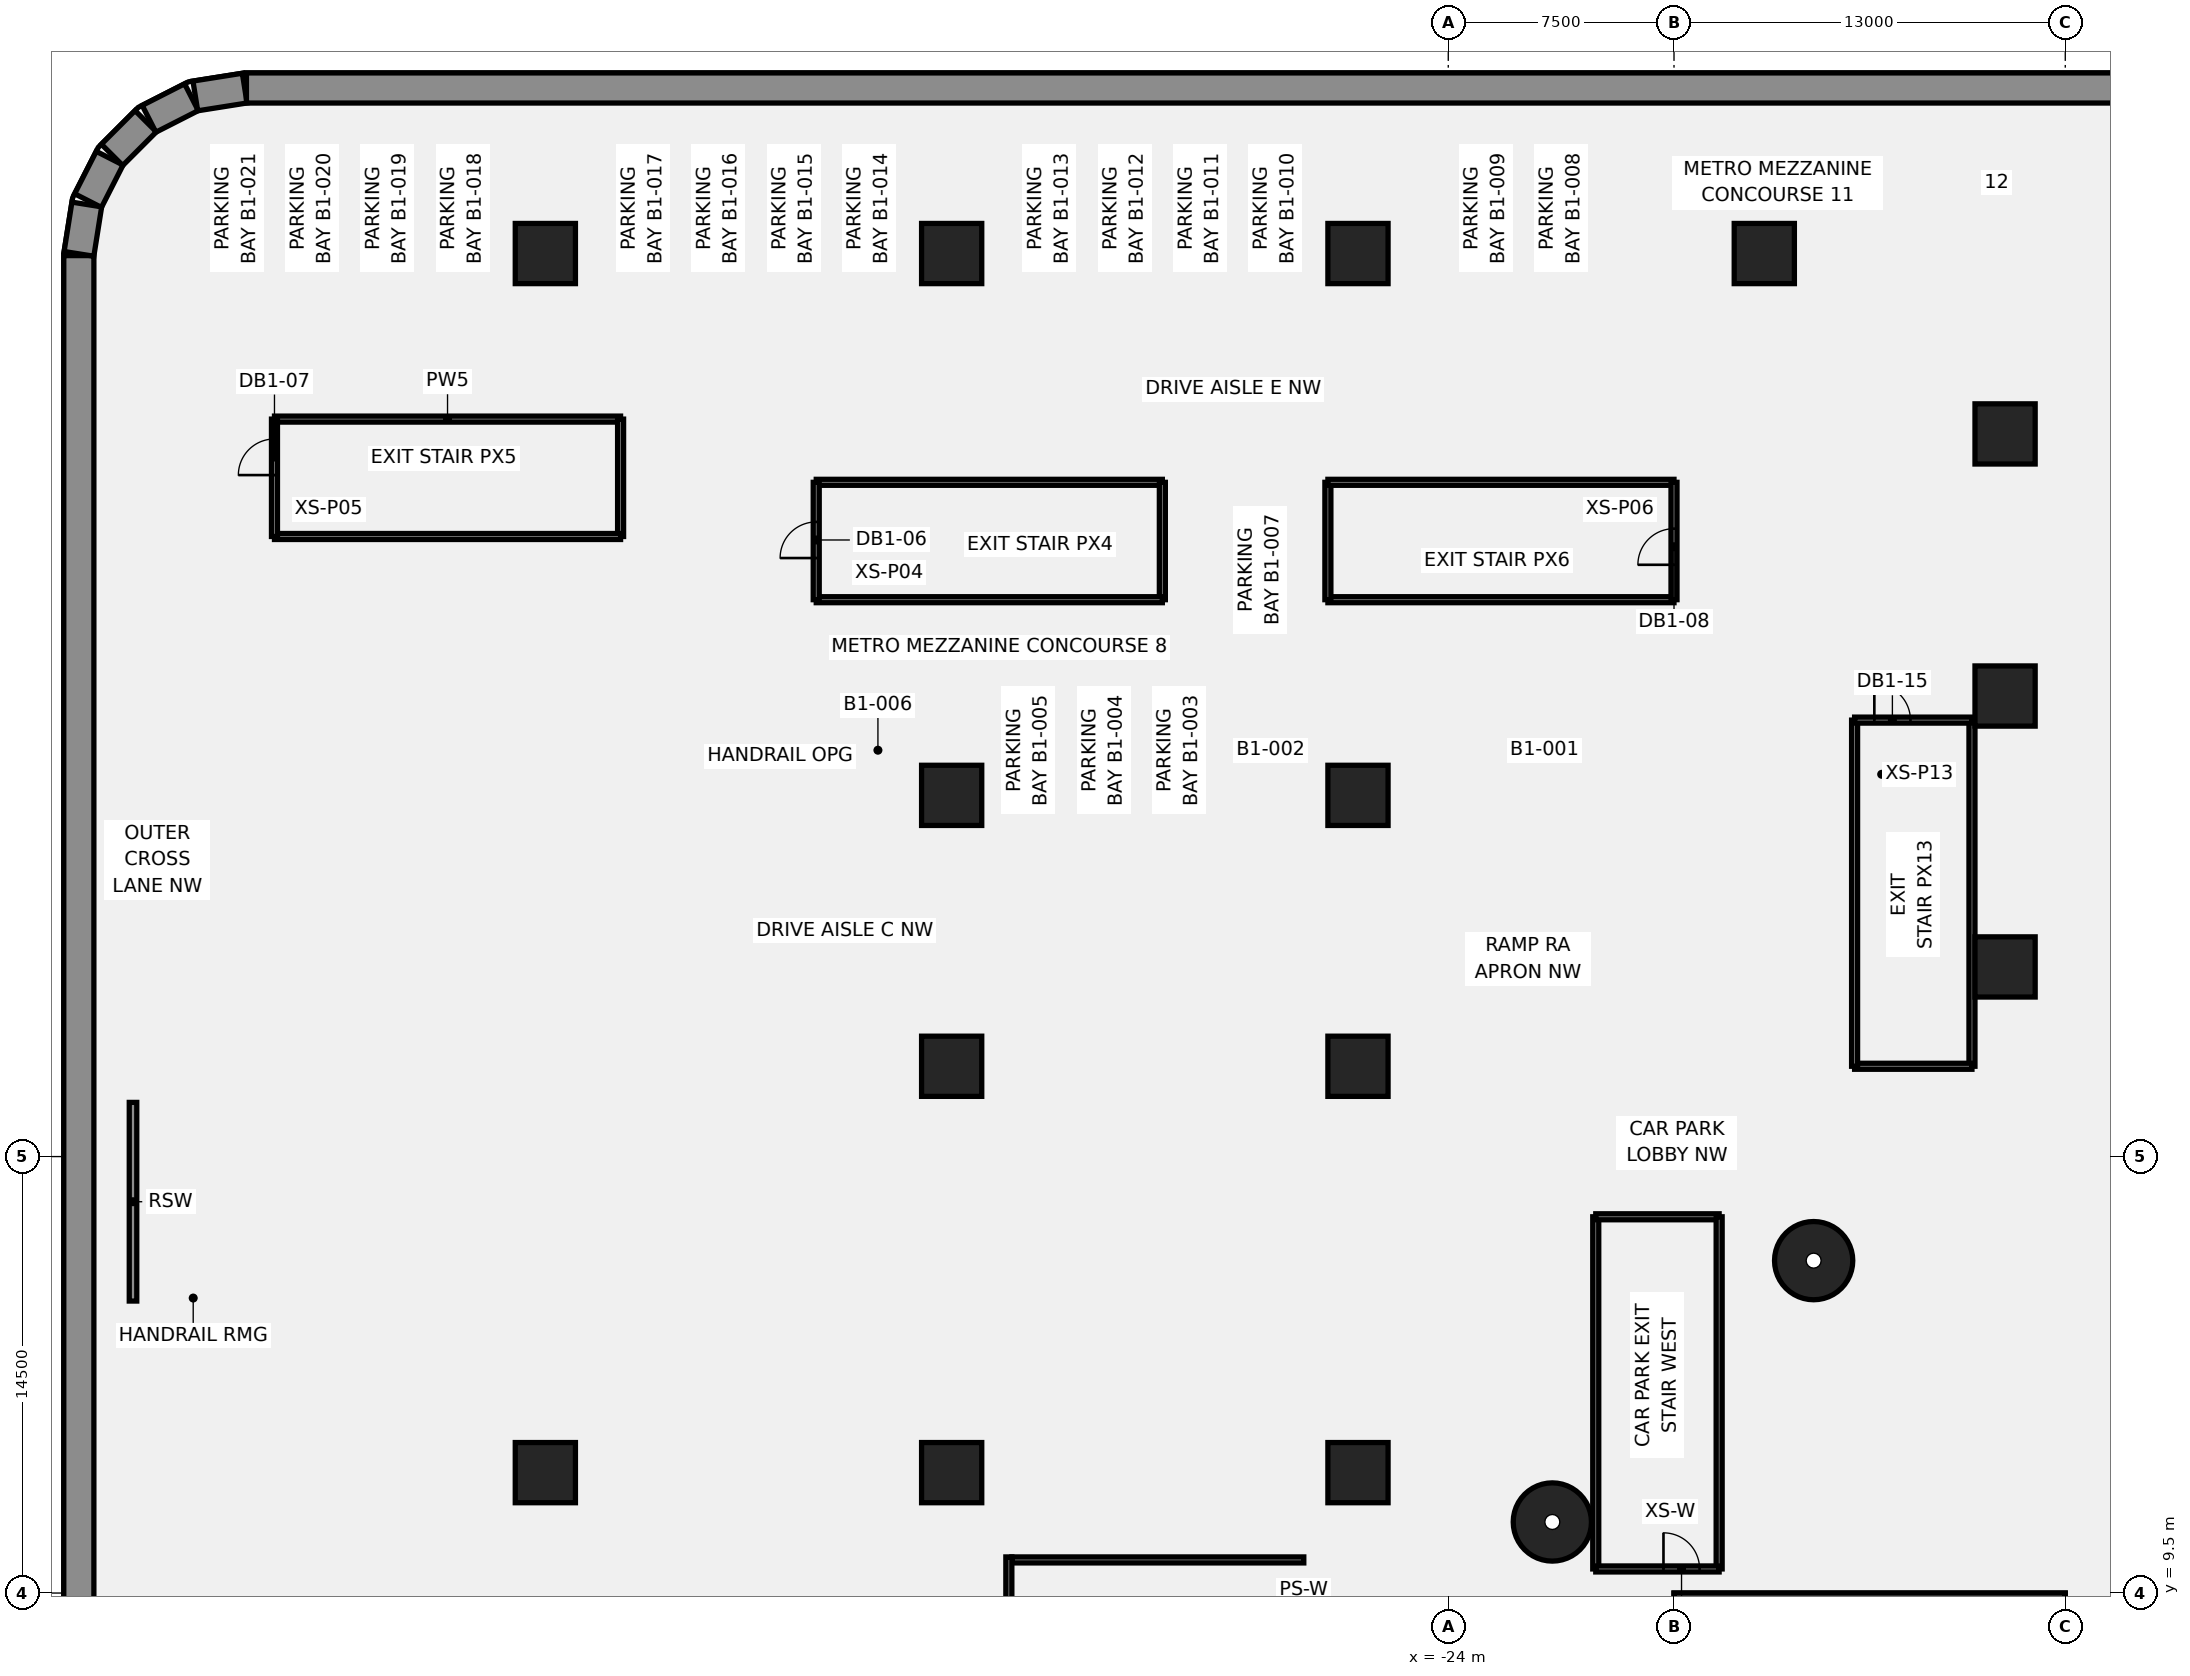
"""IFC4 building model, lengths in metres.
Left out: names, types, materials, properties, quantities, classifications, styles, units other than length and angle.
Written with IfcOpenShell. Run it as: python <this file> out.ifc"""

import sys

from ifc_helpers import new_model, si_unit, direction, frame, frame_2d, origin, origin_2d, place, context, subcontext, project, spatial, rectangle, circle, extrude, element, fill, save


model = new_model("IFC4")
c1 = context("Model", 3, precision=1e-05, world=origin(), true_north=direction((0.0, 1.0)))
c2 = subcontext(c1, "Body", "Model", "MODEL_VIEW")
j1 = project(units=[si_unit("LENGTHUNIT", "METRE"), si_unit("PLANEANGLEUNIT", "RADIAN")], contexts=[c1])
p1 = place(None, origin())
s1 = spatial("IfcSite", under=j1, at=p1, CompositionType="ELEMENT")
p2 = place(p1, origin())
s2 = spatial("IfcBuilding", under=s1, at=p2, CompositionType="ELEMENT")
p3 = place(p2, frame((0.0, 0.0, -7.0)))
s3 = spatial("IfcBuildingStorey", under=s2, at=p3, CompositionType="ELEMENT", Elevation=-7.0)
p4 = place(p3, frame((-69.5, -53.931, -0.45), z_axis=(0.0, 0.0, 1.0), x_axis=(0.0, 1.0, 0.0)))
e1 = element("IfcWall", 1, at=p4, inside=s3, PredefinedType="SOLIDWALL", context=c2, shape_type="SweptSolid", body=[
    extrude(rectangle(XDim=107.863, YDim=1.0, at=frame_2d((53.931, 0.0))), origin(), (0.0, 0.0, 1.0), 6.9),
])
p5 = place(p3, frame((-69.495, 53.99, -0.45), z_axis=(0.0, 0.0, 1.0), x_axis=(0.156430639922, 0.987688946427, 0.0)))
e2 = element("IfcWall", 2, at=p5, inside=s3, PredefinedType="SOLIDWALL", context=c2, shape_type="SweptSolid", body=[
    extrude(rectangle(XDim=1.661, YDim=1.0, at=frame_2d((0.83, 0.0))), origin(), (0.0, 0.0, 1.0), 6.9),
])
for number, where, z_axis, x_axis in (
    (3, (-69.194, 55.759, -0.45), (0.0, 0.0, 1.0), (0.454, 0.891, 0.0)),
    (4, (-68.396, 57.278, -0.45), (0.0, 0.0, 1.0), (0.707, 0.707, 0.0)),
    (5, (-67.168, 58.476, -0.45), (0.0, 0.0, 1.0), (0.891, 0.454, 0.0)),
):
    element("IfcWall", number, at=place(p3, frame(where, z_axis=z_axis, x_axis=x_axis)), inside=s3, PredefinedType="SOLIDWALL", context=c2, shape_type="SweptSolid", body=[
        extrude(rectangle(XDim=1.581, YDim=1.0, at=frame_2d((0.791, 0.0))), origin(), (0.0, 0.0, 1.0), 6.9),
    ])
p6 = place(p3, frame((-65.63, 59.236, -0.45), z_axis=(0.0, 0.0, 1.0), x_axis=(0.987688946427, 0.156430639922, 0.0)))
e6 = element("IfcWall", 6, at=p6, inside=s3, PredefinedType="SOLIDWALL", context=c2, shape_type="SweptSolid", body=[
    extrude(rectangle(XDim=1.661, YDim=1.0, at=frame_2d((0.83, 0.0))), origin(), (0.0, 0.0, 1.0), 6.9),
])
p7 = place(p3, frame((-63.931, 59.5, -0.45), z_axis=(0.0, 0.0, 1.0), x_axis=(1.0, 0.0, 0.0)))
e7 = element("IfcWall", 7, at=p7, inside=s3, PredefinedType="SOLIDWALL", context=c2, shape_type="SweptSolid", body=[
    extrude(rectangle(XDim=127.863, YDim=1.0, at=frame_2d((63.931, 0.0))), origin(), (0.0, 0.0, 1.0), 6.9),
])
for number, where, z_axis, x_axis in (
    (8, (-11.86, 20.543, -0.45), (0.0, 0.0, 1.0), (1.0, 0.0, 0.0)),
    (9, (-20.543, 11.86, -0.45), (0.0, 0.0, 1.0), (1.0, 0.0, 0.0)),
):
    element("IfcColumn", number, at=place(p3, frame(where, z_axis=z_axis, x_axis=x_axis)), inside=s3, PredefinedType="COLUMN", context=c2, shape_type="SweptSolid", body=[
        extrude(circle(Radius=1.3, at=origin_2d()), origin(), (0.0, 0.0, 1.0), 6.9),
    ])
for number, where, z_axis, x_axis in (
    (10, (-5.5, 39.3, -0.45), (0.0, 0.0, 1.0), (1.0, 0.0, 0.0)),
    (11, (-5.5, 30.3, -0.45), (0.0, 0.0, 1.0), (1.0, 0.0, 0.0)),
    (12, (-5.5, 48.008, -0.45), (0.0, 0.0, 1.0), (1.0, 0.0, 0.0)),
    (13, (-54.0, 13.5, -0.45), (0.0, 0.0, 1.0), (1.0, 0.0, 0.0)),
    (14, (-54.0, 54.0, -0.45), (0.0, 0.0, 1.0), (1.0, 0.0, 0.0)),
    (15, (-40.5, 13.5, -0.45), (0.0, 0.0, 1.0), (1.0, 0.0, 0.0)),
    (16, (-40.5, 27.0, -0.45), (0.0, 0.0, 1.0), (1.0, 0.0, 0.0)),
    (17, (-40.5, 36.0, -0.45), (0.0, 0.0, 1.0), (1.0, 0.0, 0.0)),
    (18, (-40.5, 54.0, -0.45), (0.0, 0.0, 1.0), (1.0, 0.0, 0.0)),
    (19, (-27.0, 13.5, -0.45), (0.0, 0.0, 1.0), (1.0, 0.0, 0.0)),
    (20, (-27.0, 27.0, -0.45), (0.0, 0.0, 1.0), (1.0, 0.0, 0.0)),
    (21, (-27.0, 36.0, -0.45), (0.0, 0.0, 1.0), (1.0, 0.0, 0.0)),
    (22, (-27.0, 54.0, -0.45), (0.0, 0.0, 1.0), (1.0, 0.0, 0.0)),
    (23, (-13.5, 54.0, -0.45), (0.0, 0.0, 1.0), (1.0, 0.0, 0.0)),
):
    element("IfcColumn", number, at=place(p3, frame(where, z_axis=z_axis, x_axis=x_axis)), inside=s3, PredefinedType="COLUMN", context=c2, shape_type="SweptSolid", body=[
        extrude(rectangle(XDim=2.0, YDim=2.0, at=origin_2d()), origin(), (0.0, 0.0, 1.0), 6.9),
    ])
p8 = place(p3, frame((-63.0, 48.5, 0.0), z_axis=(0.0, 0.0, 1.0), x_axis=(1.0, 0.0, 0.0)))
e24 = element("IfcWall", 24, at=p8, inside=s3, PredefinedType="PARTITIONING", context=c2, shape_type="SweptSolid", body=[
    extrude(rectangle(XDim=11.5, YDim=0.2, at=frame_2d((5.75, 0.0))), origin(), (0.0, 0.0, 1.0), 6.45),
])
p9 = place(p3, frame((-51.5, 44.6, 0.0), z_axis=(0.0, 0.0, 1.0), x_axis=(0.0, 1.0, 0.0)))
e25 = element("IfcWall", 25, at=p9, inside=s3, PredefinedType="PARTITIONING", context=c2, shape_type="SweptSolid", body=[
    extrude(rectangle(XDim=3.9, YDim=0.2, at=frame_2d((1.95, 0.0))), origin(), (0.0, 0.0, 1.0), 6.45),
])
p10 = place(p3, frame((-63.0, 44.6, 0.0), z_axis=(0.0, 0.0, 1.0), x_axis=(1.0, 0.0, 0.0)))
e26 = element("IfcWall", 26, at=p10, inside=s3, PredefinedType="PARTITIONING", context=c2, shape_type="SweptSolid", body=[
    extrude(rectangle(XDim=11.5, YDim=0.2, at=frame_2d((5.75, 0.0))), origin(), (0.0, 0.0, 1.0), 6.45),
])
p11 = place(p3, frame((-63.0, 44.6, 0.0), z_axis=(0.0, 0.0, 1.0), x_axis=(0.0, 1.0, 0.0)))
e27 = element("IfcWall", 27, at=p11, inside=s3, PredefinedType="PARTITIONING", context=c2, shape_type="SweptSolid", body=[
    extrude(rectangle(XDim=3.9, YDim=0.2, at=frame_2d((1.95, 0.0))), origin(), (0.0, 0.0, 1.0), 6.45),
])
p12 = place(p11, frame((2.04, 0.0, 0.0)))
e28 = element("IfcOpeningElement", 28, at=p12, cuts=e27, PredefinedType="OPENING", context=c2, shape_type="SweptSolid", body=[
    extrude(rectangle(XDim=1.2, YDim=2.1, at=frame_2d((0.6, 1.05))), frame((0.0, 0.11, 0.0), z_axis=(0.0, -1.0, 0.0), x_axis=(1.0, 0.0, 0.0)), (0.0, 0.0, 1.0), 0.22),
])
p13 = place(p3, frame((-45.0, 46.4, 0.0), z_axis=(0.0, 0.0, 1.0), x_axis=(1.0, 0.0, 0.0)))
e29 = element("IfcWall", 29, at=p13, inside=s3, PredefinedType="PARTITIONING", context=c2, shape_type="SweptSolid", body=[
    extrude(rectangle(XDim=11.5, YDim=0.2, at=frame_2d((5.75, 0.0))), origin(), (0.0, 0.0, 1.0), 6.45),
])
p14 = place(p3, frame((-33.5, 42.5, 0.0), z_axis=(0.0, 0.0, 1.0), x_axis=(0.0, 1.0, 0.0)))
e30 = element("IfcWall", 30, at=p14, inside=s3, PredefinedType="PARTITIONING", context=c2, shape_type="SweptSolid", body=[
    extrude(rectangle(XDim=3.9, YDim=0.2, at=frame_2d((1.95, 0.0))), origin(), (0.0, 0.0, 1.0), 6.45),
])
p15 = place(p3, frame((-45.0, 42.5, 0.0), z_axis=(0.0, 0.0, 1.0), x_axis=(1.0, 0.0, 0.0)))
e31 = element("IfcWall", 31, at=p15, inside=s3, PredefinedType="PARTITIONING", context=c2, shape_type="SweptSolid", body=[
    extrude(rectangle(XDim=11.5, YDim=0.2, at=frame_2d((5.75, 0.0))), origin(), (0.0, 0.0, 1.0), 6.45),
])
p16 = place(p3, frame((-45.0, 42.5, 0.0), z_axis=(0.0, 0.0, 1.0), x_axis=(0.0, 1.0, 0.0)))
e32 = element("IfcWall", 32, at=p16, inside=s3, PredefinedType="PARTITIONING", context=c2, shape_type="SweptSolid", body=[
    extrude(rectangle(XDim=3.9, YDim=0.2, at=frame_2d((1.95, 0.0))), origin(), (0.0, 0.0, 1.0), 6.45),
])
p17 = place(p16, frame((1.384, 0.0, 0.0)))
e33 = element("IfcOpeningElement", 33, at=p17, cuts=e32, PredefinedType="OPENING", context=c2, shape_type="SweptSolid", body=[
    extrude(rectangle(XDim=1.2, YDim=2.1, at=frame_2d((0.6, 1.05))), frame((0.0, 0.11, 0.0), z_axis=(0.0, -1.0, 0.0), x_axis=(1.0, 0.0, 0.0)), (0.0, 0.0, 1.0), 0.22),
])
p18 = place(p3, frame((-19.1, 10.3, 0.0), z_axis=(0.0, 0.0, 1.0), x_axis=(0.0, 1.0, 0.0)))
e34 = element("IfcWall", 34, at=p18, inside=s3, PredefinedType="PARTITIONING", context=c2, shape_type="SweptSolid", body=[
    extrude(rectangle(XDim=11.7, YDim=0.2, at=frame_2d((5.85, 0.0))), origin(), (0.0, 0.0, 1.0), 6.45),
])
p19 = place(p3, frame((-19.1, 22.0, 0.0), z_axis=(0.0, 0.0, 1.0), x_axis=(1.0, 0.0, 0.0)))
e35 = element("IfcWall", 35, at=p19, inside=s3, PredefinedType="PARTITIONING", context=c2, shape_type="SweptSolid", body=[
    extrude(rectangle(XDim=4.1, YDim=0.2, at=frame_2d((2.05, 0.0))), origin(), (0.0, 0.0, 1.0), 6.45),
])
p20 = place(p3, frame((-15.0, 10.3, 0.0), z_axis=(0.0, 0.0, 1.0), x_axis=(0.0, 1.0, 0.0)))
e36 = element("IfcWall", 36, at=p20, inside=s3, PredefinedType="PARTITIONING", context=c2, shape_type="SweptSolid", body=[
    extrude(rectangle(XDim=11.7, YDim=0.2, at=frame_2d((5.85, 0.0))), origin(), (0.0, 0.0, 1.0), 6.45),
])
p21 = place(p3, frame((-19.1, 10.3, 0.0), z_axis=(0.0, 0.0, 1.0), x_axis=(1.0, 0.0, 0.0)))
e37 = element("IfcWall", 37, at=p21, inside=s3, PredefinedType="PARTITIONING", context=c2, shape_type="SweptSolid", body=[
    extrude(rectangle(XDim=4.1, YDim=0.2, at=frame_2d((2.05, 0.0))), origin(), (0.0, 0.0, 1.0), 6.45),
])
p22 = place(p21, frame((2.25, 0.0, 0.0)))
e38 = element("IfcOpeningElement", 38, at=p22, cuts=e37, PredefinedType="OPENING", context=c2, shape_type="SweptSolid", body=[
    extrude(rectangle(XDim=1.2, YDim=2.1, at=frame_2d((0.6, 1.05))), frame((0.0, 0.11, 0.0), z_axis=(0.0, -1.0, 0.0), x_axis=(1.0, 0.0, 0.0)), (0.0, 0.0, 1.0), 0.22),
])
p23 = place(p3, frame((-28.0, 42.5, 0.0), z_axis=(0.0, 0.0, 1.0), x_axis=(1.0, 0.0, 0.0)))
e39 = element("IfcWall", 39, at=p23, inside=s3, PredefinedType="PARTITIONING", context=c2, shape_type="SweptSolid", body=[
    extrude(rectangle(XDim=11.5, YDim=0.2, at=frame_2d((5.75, 0.0))), origin(), (0.0, 0.0, 1.0), 6.45),
])
p24 = place(p3, frame((-28.0, 42.5, 0.0), z_axis=(0.0, 0.0, 1.0), x_axis=(0.0, 1.0, 0.0)))
e40 = element("IfcWall", 40, at=p24, inside=s3, PredefinedType="PARTITIONING", context=c2, shape_type="SweptSolid", body=[
    extrude(rectangle(XDim=3.9, YDim=0.2, at=frame_2d((1.95, 0.0))), origin(), (0.0, 0.0, 1.0), 6.45),
])
p25 = place(p3, frame((-28.0, 46.4, 0.0), z_axis=(0.0, 0.0, 1.0), x_axis=(1.0, 0.0, 0.0)))
e41 = element("IfcWall", 41, at=p25, inside=s3, PredefinedType="PARTITIONING", context=c2, shape_type="SweptSolid", body=[
    extrude(rectangle(XDim=11.5, YDim=0.2, at=frame_2d((5.75, 0.0))), origin(), (0.0, 0.0, 1.0), 6.45),
])
p26 = place(p3, frame((-16.5, 42.5, 0.0), z_axis=(0.0, 0.0, 1.0), x_axis=(0.0, 1.0, 0.0)))
e42 = element("IfcWall", 42, at=p26, inside=s3, PredefinedType="PARTITIONING", context=c2, shape_type="SweptSolid", body=[
    extrude(rectangle(XDim=3.9, YDim=0.2, at=frame_2d((1.95, 0.0))), origin(), (0.0, 0.0, 1.0), 6.45),
])
p27 = place(p26, frame((1.16, 0.0, 0.0)))
e43 = element("IfcOpeningElement", 43, at=p27, cuts=e42, PredefinedType="OPENING", context=c2, shape_type="SweptSolid", body=[
    extrude(rectangle(XDim=1.2, YDim=2.1, at=frame_2d((0.6, 1.05))), frame((0.0, 0.11, 0.0), z_axis=(0.0, -1.0, 0.0), x_axis=(1.0, 0.0, 0.0)), (0.0, 0.0, 1.0), 0.22),
])
p28 = place(p3, frame((-6.6, 27.0, 0.0), z_axis=(0.0, 0.0, 1.0), x_axis=(0.0, 1.0, 0.0)))
e44 = element("IfcWall", 44, at=p28, inside=s3, PredefinedType="PARTITIONING", context=c2, shape_type="SweptSolid", body=[
    extrude(rectangle(XDim=11.5, YDim=0.2, at=frame_2d((5.75, 0.0))), origin(), (0.0, 0.0, 1.0), 6.45),
])
p29 = place(p3, frame((-10.5, 27.0, 0.0), z_axis=(0.0, 0.0, 1.0), x_axis=(1.0, 0.0, 0.0)))
e45 = element("IfcWall", 45, at=p29, inside=s3, PredefinedType="PARTITIONING", context=c2, shape_type="SweptSolid", body=[
    extrude(rectangle(XDim=3.9, YDim=0.2, at=frame_2d((1.95, 0.0))), origin(), (0.0, 0.0, 1.0), 6.45),
])
p30 = place(p3, frame((-10.5, 27.0, 0.0), z_axis=(0.0, 0.0, 1.0), x_axis=(0.0, 1.0, 0.0)))
e46 = element("IfcWall", 46, at=p30, inside=s3, PredefinedType="PARTITIONING", context=c2, shape_type="SweptSolid", body=[
    extrude(rectangle(XDim=11.5, YDim=0.2, at=frame_2d((5.75, 0.0))), origin(), (0.0, 0.0, 1.0), 6.45),
])
p31 = place(p3, frame((-10.5, 38.5, 0.0), z_axis=(0.0, 0.0, 1.0), x_axis=(1.0, 0.0, 0.0)))
e47 = element("IfcWall", 47, at=p31, inside=s3, PredefinedType="PARTITIONING", context=c2, shape_type="SweptSolid", body=[
    extrude(rectangle(XDim=3.9, YDim=0.2, at=frame_2d((1.95, 0.0))), origin(), (0.0, 0.0, 1.0), 6.45),
])
p32 = place(p31, frame((0.656, 0.0, 0.0)))
e48 = element("IfcOpeningElement", 48, at=p32, cuts=e47, PredefinedType="OPENING", context=c2, shape_type="SweptSolid", body=[
    extrude(rectangle(XDim=1.2, YDim=2.1, at=frame_2d((0.6, 1.05))), frame((0.0, 0.11, 0.0), z_axis=(0.0, -1.0, 0.0), x_axis=(1.0, 0.0, 0.0)), (0.0, 0.0, 1.0), 0.22),
])
p33 = place(p3, frame((-28.8, 10.6, 0.0), z_axis=(0.0, 0.0, 1.0), x_axis=(-1.0, 0.0, 0.0)))
e49 = element("IfcWall", 49, at=p33, inside=s3, PredefinedType="SOLIDWALL", context=c2, shape_type="SweptSolid", body=[
    extrude(rectangle(XDim=9.7, YDim=0.2, at=frame_2d((4.85, 0.0))), origin(), (0.0, 0.0, 1.0), 6.45),
])
p34 = place(p3, frame((-38.6, 10.7, 0.0), z_axis=(0.0, 0.0, 1.0), x_axis=(0.0, -1.0, 0.0)))
e50 = element("IfcWall", 50, at=p34, inside=s3, PredefinedType="SOLIDWALL", context=c2, shape_type="SweptSolid", body=[
    extrude(rectangle(XDim=4.3, YDim=0.2, at=frame_2d((2.15, 0.0))), origin(), (0.0, 0.0, 1.0), 6.45),
])
p35 = place(p3, frame((-67.7, 19.2, 0.0), z_axis=(0.0, 0.0, 1.0), x_axis=(0.0, 1.0, 0.0)))
e51 = element("IfcWall", 51, at=p35, inside=s3, PredefinedType="SOLIDWALL", context=c2, shape_type="SweptSolid", body=[
    extrude(rectangle(XDim=6.6, YDim=0.25, at=frame_2d((3.3, 0.0))), origin(), (0.0, 0.0, 1.0), 6.483),
])
p36 = place(p3, frame((-16.5, 9.15, 0.0), z_axis=(0.0, 0.0, 1.0), x_axis=(1.0, 0.0, 0.0)))
e52 = element("IfcWall", 52, at=p36, inside=s3, PredefinedType="SHEAR", context=c2, shape_type="SweptSolid", body=[
    extrude(rectangle(XDim=13.0, YDim=0.7, at=frame_2d((6.5, 0.0))), origin(), (0.0, 0.0, 1.0), 6.45),
])
p37 = place(p22, origin())
e53 = element("IfcDoor", 53, at=p37, inside=s3, OperationType="SINGLE_SWING_LEFT", PredefinedType="DOOR", context=c2, shape_type="SweptSolid", body=[
    extrude(rectangle(XDim=1.2, YDim=2.1, at=frame_2d((0.6, 1.05))), frame((0.0, 0.025, 0.0), z_axis=(0.0, -1.0, 0.0), x_axis=(1.0, 0.0, 0.0)), (0.0, 0.0, 1.0), 0.05),
])
fill(e38, e53)
p38 = place(p17, origin())
e54 = element("IfcDoor", 54, at=p38, inside=s3, OperationType="SINGLE_SWING_RIGHT", PredefinedType="DOOR", context=c2, shape_type="SweptSolid", body=[
    extrude(rectangle(XDim=1.2, YDim=2.1, at=frame_2d((0.6, 1.05))), frame((0.0, 0.025, 0.0), z_axis=(0.0, -1.0, 0.0), x_axis=(1.0, 0.0, 0.0)), (0.0, 0.0, 1.0), 0.05),
])
fill(e33, e54)
p39 = place(p12, origin())
e55 = element("IfcDoor", 55, at=p39, inside=s3, OperationType="SINGLE_SWING_LEFT", PredefinedType="DOOR", context=c2, shape_type="SweptSolid", body=[
    extrude(rectangle(XDim=1.2, YDim=2.1, at=frame_2d((0.6, 1.05))), frame((0.0, 0.025, 0.0), z_axis=(0.0, -1.0, 0.0), x_axis=(1.0, 0.0, 0.0)), (0.0, 0.0, 1.0), 0.05),
])
fill(e28, e55)
p40 = place(p27, origin())
e56 = element("IfcDoor", 56, at=p40, inside=s3, OperationType="SINGLE_SWING_RIGHT", PredefinedType="DOOR", context=c2, shape_type="SweptSolid", body=[
    extrude(rectangle(XDim=1.2, YDim=2.1, at=frame_2d((0.6, 1.05))), frame((0.0, 0.025, 0.0), z_axis=(0.0, -1.0, 0.0), x_axis=(1.0, 0.0, 0.0)), (0.0, 0.0, 1.0), 0.05),
])
fill(e43, e56)
p41 = place(p32, origin())
e57 = element("IfcDoor", 57, at=p41, inside=s3, OperationType="SINGLE_SWING_LEFT", PredefinedType="DOOR", context=c2, shape_type="SweptSolid", body=[
    extrude(rectangle(XDim=1.2, YDim=2.1, at=frame_2d((0.6, 1.05))), frame((0.0, 0.025, 0.0), z_axis=(0.0, -1.0, 0.0), x_axis=(1.0, 0.0, 0.0)), (0.0, 0.0, 1.0), 0.05),
])
fill(e48, e57)
save(model, sys.argv[1])
